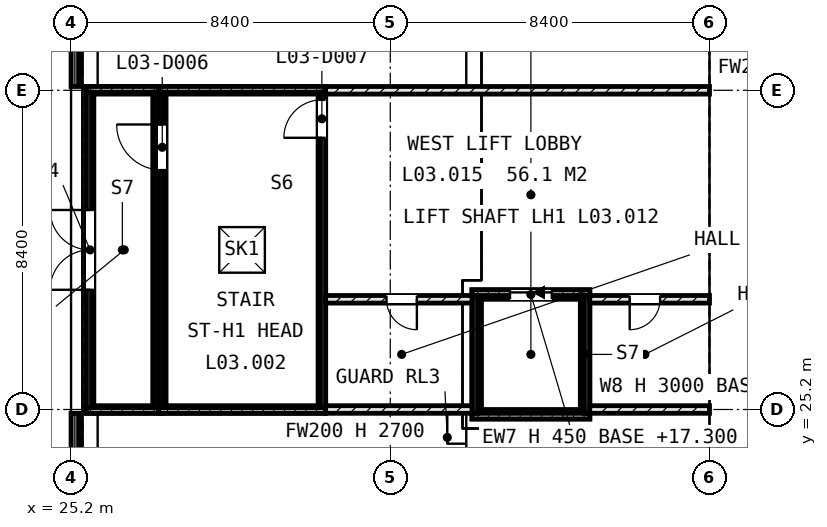
"""IFC4 building model, lengths in metres.
Left out: names, types, materials, properties, quantities, classifications, styles, units other than length and angle.
Written with IfcOpenShell. Run it as: python <this file> out.ifc"""

import sys

from ifc_helpers import new_model, si_unit, direction, frame, frame_2d, origin, origin_2d, place, context, subcontext, project, spatial, rectangle, extrude, element, fill, save


model = new_model("IFC4")
c1 = context("Model", 3, precision=1e-05, world=origin(), true_north=direction((0.0, 1.0)))
c2 = subcontext(c1, "Body", "Model", "MODEL_VIEW")
j1 = project(units=[si_unit("LENGTHUNIT", "METRE"), si_unit("PLANEANGLEUNIT", "RADIAN")], contexts=[c1])
p1 = place(None, origin())
s1 = spatial("IfcSite", under=j1, at=p1, CompositionType="ELEMENT")
p2 = place(p1, origin())
s2 = spatial("IfcBuilding", under=s1, at=p2, CompositionType="ELEMENT")
p3 = place(p2, frame((0.0, 0.0, 14.4)))
s3 = spatial("IfcBuildingStorey", under=s2, at=p3, CompositionType="ELEMENT", Elevation=14.4)
p4 = place(p3, frame((35.75, 25.075, -0.3), z_axis=(0.0, 0.0, 1.0), x_axis=(1.0, 0.0, 0.0)))
e1 = element("IfcWall", 1, at=p4, inside=s3, PredefinedType="SHEAR", context=c2, shape_type="SweptSolid", body=[
    extrude(rectangle(XDim=3.1, YDim=0.25, at=frame_2d((1.55, 0.0))), origin(), (0.0, 0.0, 1.0), 3.0),
])
p5 = place(p3, frame((35.75, 28.225, -0.3), z_axis=(0.0, 0.0, 1.0), x_axis=(1.0, 0.0, 0.0)))
e2 = element("IfcWall", 2, at=p5, inside=s3, PredefinedType="SHEAR", context=c2, shape_type="SweptSolid", body=[
    extrude(rectangle(XDim=3.1, YDim=0.25, at=frame_2d((1.55, 0.0))), origin(), (0.0, 0.0, 1.0), 3.0),
])
p6 = place(p5, frame((1.0, 0.0, 0.3)))
e3 = element("IfcOpeningElement", 3, at=p6, cuts=e2, PredefinedType="OPENING", context=c2, shape_type="SweptSolid", body=[
    extrude(rectangle(XDim=1.1, YDim=2.1, at=frame_2d((0.55, 1.05))), frame((0.0, 0.135, 0.0), z_axis=(0.0, -1.0, 0.0), x_axis=(1.0, 0.0, 0.0)), (0.0, 0.0, 1.0), 0.27),
])
for number, where, z_axis, x_axis in (
    (4, (35.875, 25.2, -0.3), (0.0, 0.0, 1.0), (0.0, 1.0, 0.0)),
    (5, (38.725, 25.2, -0.3), (0.0, 0.0, 1.0), (0.0, 1.0, 0.0)),
):
    element("IfcWall", number, at=place(p3, frame(where, z_axis=z_axis, x_axis=x_axis)), inside=s3, PredefinedType="SHEAR", context=c2, shape_type="SweptSolid", body=[
        extrude(rectangle(XDim=2.9, YDim=0.25, at=frame_2d((1.45, 0.0))), origin(), (0.0, 0.0, 1.0), 3.0),
    ])
for number, where, z_axis, x_axis in (
    (6, (27.5, 25.2, -0.3), (0.0, 0.0, 1.0), (1.0, 0.0, 0.0)),
    (7, (27.5, 33.6, -0.3), (0.0, 0.0, 1.0), (1.0, 0.0, 0.0)),
):
    element("IfcWall", number, at=place(p3, frame(where, z_axis=z_axis, x_axis=x_axis)), inside=s3, PredefinedType="SHEAR", context=c2, shape_type="SweptSolid", body=[
        extrude(rectangle(XDim=4.4, YDim=0.2, at=frame_2d((2.2, 0.0))), origin(), (0.0, 0.0, 1.0), 3.0),
    ])
p7 = place(p3, frame((27.6, 25.3, -0.3), z_axis=(0.0, 0.0, 1.0), x_axis=(0.0, 1.0, 0.0)))
e8 = element("IfcWall", 8, at=p7, inside=s3, PredefinedType="SHEAR", context=c2, shape_type="SweptSolid", body=[
    extrude(rectangle(XDim=8.2, YDim=0.2, at=frame_2d((4.1, 0.0))), origin(), (0.0, 0.0, 1.0), 3.0),
])
p8 = place(p7, frame((6.2, 0.0, 0.3)))
e9 = element("IfcOpeningElement", 9, at=p8, cuts=e8, PredefinedType="OPENING", context=c2, shape_type="SweptSolid", body=[
    extrude(rectangle(XDim=1.2, YDim=2.2, at=frame_2d((0.6, 1.1))), frame((0.0, 0.11, 0.0), z_axis=(0.0, -1.0, 0.0), x_axis=(1.0, 0.0, 0.0)), (0.0, 0.0, 1.0), 0.22),
])
p9 = place(p3, frame((31.8, 25.3, -0.3), z_axis=(0.0, 0.0, 1.0), x_axis=(0.0, 1.0, 0.0)))
e10 = element("IfcWall", 10, at=p9, inside=s3, PredefinedType="SHEAR", context=c2, shape_type="SweptSolid", body=[
    extrude(rectangle(XDim=8.2, YDim=0.2, at=frame_2d((4.1, 0.0))), origin(), (0.0, 0.0, 1.0), 3.0),
])
p10 = place(p9, frame((7.05, 0.0, 0.3)))
e11 = element("IfcOpeningElement", 11, at=p10, cuts=e10, PredefinedType="OPENING", context=c2, shape_type="SweptSolid", body=[
    extrude(rectangle(XDim=1.0, YDim=2.1, at=frame_2d((0.5, 1.05))), frame((0.0, 0.11, 0.0), z_axis=(0.0, -1.0, 0.0), x_axis=(1.0, 0.0, 0.0)), (0.0, 0.0, 1.0), 0.22),
])
for number, where, z_axis, x_axis in (
    (12, (27.6, 25.2, -0.3), (0.0, 0.0, 1.0), (-1.0, 0.0, 0.0)),
    (13, (27.6, 33.6, -0.3), (0.0, 0.0, 1.0), (-1.0, 0.0, 0.0)),
):
    element("IfcWall", number, at=place(p3, frame(where, z_axis=z_axis, x_axis=x_axis)), inside=s3, PredefinedType="SHEAR", context=c2, shape_type="SweptSolid", body=[
        extrude(rectangle(XDim=1.9, YDim=0.2, at=frame_2d((0.95, 0.0))), origin(), (0.0, 0.0, 1.0), 3.0),
    ])
p11 = place(p3, frame((25.7, 25.1, -0.3), z_axis=(0.0, 0.0, 1.0), x_axis=(0.0, 1.0, 0.0)))
e14 = element("IfcWall", 14, at=p11, inside=s3, PredefinedType="SHEAR", context=c2, shape_type="SweptSolid", body=[
    extrude(rectangle(XDim=8.6, YDim=0.2, at=frame_2d((4.3, 0.0))), origin(), (0.0, 0.0, 1.0), 3.0),
])
p12 = place(p11, frame((3.25, 0.0, 0.3)))
e15 = element("IfcOpeningElement", 15, at=p12, cuts=e14, PredefinedType="OPENING", context=c2, shape_type="SweptSolid", body=[
    extrude(rectangle(XDim=2.1, YDim=2.2, at=frame_2d((1.05, 1.1))), frame((0.0, 0.11, 0.0), z_axis=(0.0, -1.0, 0.0), x_axis=(1.0, 0.0, 0.0)), (0.0, 0.0, 1.0), 0.22),
])
p13 = place(p3, frame((25.3, 8.4, 0.0), z_axis=(0.0, 0.0, 1.0), x_axis=(0.0, 1.0, 0.0)))
e16 = element("IfcWall", 16, at=p13, inside=s3, PredefinedType="PARAPET", context=c2, shape_type="SweptSolid", body=[
    extrude(rectangle(XDim=16.7, YDim=0.2, at=frame_2d((8.35, 0.0))), origin(), (0.0, 0.0, 1.0), 1.5),
])
p14 = place(p3, frame((25.3, 33.7, 0.0), z_axis=(0.0, 0.0, 1.0), x_axis=(0.0, 1.0, 0.0)))
e17 = element("IfcWall", 17, at=p14, inside=s3, PredefinedType="PARAPET", context=c2, shape_type="SweptSolid", body=[
    extrude(rectangle(XDim=8.2, YDim=0.2, at=frame_2d((4.1, 0.0))), origin(), (0.0, 0.0, 1.0), 1.5),
])
for number, where, z_axis, x_axis in (
    (18, (27.5, 25.175, 2.9), (0.0, 0.0, 1.0), (1.0, 0.0, 0.0)),
    (19, (27.5, 33.625, 2.9), (0.0, 0.0, 1.0), (1.0, 0.0, 0.0)),
):
    element("IfcWall", number, at=place(p3, frame(where, z_axis=z_axis, x_axis=x_axis)), inside=s3, PredefinedType="PARAPET", context=c2, shape_type="SweptSolid", body=[
        extrude(rectangle(XDim=4.4, YDim=0.15, at=frame_2d((2.2, 0.0))), origin(), (0.0, 0.0, 1.0), 0.45),
    ])
for number, where, z_axis, x_axis in (
    (20, (27.575, 25.25, 2.9), (0.0, 0.0, 1.0), (0.0, 1.0, 0.0)),
    (21, (31.825, 25.25, 2.9), (0.0, 0.0, 1.0), (0.0, 1.0, 0.0)),
):
    element("IfcWall", number, at=place(p3, frame(where, z_axis=z_axis, x_axis=x_axis)), inside=s3, PredefinedType="PARAPET", context=c2, shape_type="SweptSolid", body=[
        extrude(rectangle(XDim=8.3, YDim=0.15, at=frame_2d((4.15, 0.0))), origin(), (0.0, 0.0, 1.0), 0.45),
    ])
for number, where, z_axis, x_axis in (
    (22, (25.6, 25.175, 2.9), (0.0, 0.0, 1.0), (1.0, 0.0, 0.0)),
    (23, (25.6, 33.625, 2.9), (0.0, 0.0, 1.0), (1.0, 0.0, 0.0)),
):
    element("IfcWall", number, at=place(p3, frame(where, z_axis=z_axis, x_axis=x_axis)), inside=s3, PredefinedType="PARAPET", context=c2, shape_type="SweptSolid", body=[
        extrude(rectangle(XDim=1.9, YDim=0.15, at=frame_2d((0.95, 0.0))), origin(), (0.0, 0.0, 1.0), 0.45),
    ])
for number, where, z_axis, x_axis in (
    (24, (25.675, 25.25, 2.9), (0.0, 0.0, 1.0), (0.0, 1.0, 0.0)),
    (25, (27.425, 25.25, 2.9), (0.0, 0.0, 1.0), (0.0, 1.0, 0.0)),
):
    element("IfcWall", number, at=place(p3, frame(where, z_axis=z_axis, x_axis=x_axis)), inside=s3, PredefinedType="PARAPET", context=c2, shape_type="SweptSolid", body=[
        extrude(rectangle(XDim=8.3, YDim=0.15, at=frame_2d((4.15, 0.0))), origin(), (0.0, 0.0, 1.0), 0.45),
    ])
for number, where, z_axis, x_axis in (
    (26, (35.75, 25.025, 2.9), (0.0, 0.0, 1.0), (1.0, 0.0, 0.0)),
    (27, (35.75, 28.275, 2.9), (0.0, 0.0, 1.0), (1.0, 0.0, 0.0)),
):
    element("IfcWall", number, at=place(p3, frame(where, z_axis=z_axis, x_axis=x_axis)), inside=s3, PredefinedType="PARAPET", context=c2, shape_type="SweptSolid", body=[
        extrude(rectangle(XDim=3.1, YDim=0.15, at=frame_2d((1.55, 0.0))), origin(), (0.0, 0.0, 1.0), 0.45),
    ])
for number, where, z_axis, x_axis in (
    (28, (35.825, 25.1, 2.9), (0.0, 0.0, 1.0), (0.0, 1.0, 0.0)),
    (29, (38.775, 25.1, 2.9), (0.0, 0.0, 1.0), (0.0, 1.0, 0.0)),
):
    element("IfcWall", number, at=place(p3, frame(where, z_axis=z_axis, x_axis=x_axis)), inside=s3, PredefinedType="PARAPET", context=c2, shape_type="SweptSolid", body=[
        extrude(rectangle(XDim=3.1, YDim=0.15, at=frame_2d((1.55, 0.0))), origin(), (0.0, 0.0, 1.0), 0.45),
    ])
p15 = place(p3, frame((31.9, 25.2, 0.0), z_axis=(0.0, 0.0, 1.0), x_axis=(1.0, 0.0, 0.0)))
e30 = element("IfcWall", 30, at=p15, inside=s3, PredefinedType="SOLIDWALL", context=c2, shape_type="SweptSolid", body=[
    extrude(rectangle(XDim=3.85, YDim=0.2, at=frame_2d((1.925, 0.0))), origin(), (0.0, 0.0, 1.0), 2.7),
])
p16 = place(p3, frame((38.85, 25.2, 0.0), z_axis=(0.0, 0.0, 1.0), x_axis=(1.0, 0.0, 0.0)))
e31 = element("IfcWall", 31, at=p16, inside=s3, PredefinedType="SOLIDWALL", context=c2, shape_type="SweptSolid", body=[
    extrude(rectangle(XDim=3.15, YDim=0.2, at=frame_2d((1.575, 0.0))), origin(), (0.0, 0.0, 1.0), 2.7),
])
p17 = place(p3, frame((31.9, 28.1, 0.0), z_axis=(0.0, 0.0, 1.0), x_axis=(1.0, 0.0, 0.0)))
e32 = element("IfcWall", 32, at=p17, inside=s3, PredefinedType="SOLIDWALL", context=c2, shape_type="SweptSolid", body=[
    extrude(rectangle(XDim=3.85, YDim=0.2, at=frame_2d((1.925, 0.0))), origin(), (0.0, 0.0, 1.0), 2.7),
])
p18 = place(p17, frame((1.6, 0.0, 0.0)))
e33 = element("IfcOpeningElement", 33, at=p18, cuts=e32, PredefinedType="OPENING", context=c2, shape_type="SweptSolid", body=[
    extrude(rectangle(XDim=0.8, YDim=2.1, at=frame_2d((0.4, 1.05))), frame((0.0, 0.11, 0.0), z_axis=(0.0, -1.0, 0.0), x_axis=(1.0, 0.0, 0.0)), (0.0, 0.0, 1.0), 0.22),
])
p19 = place(p3, frame((38.85, 28.1, 0.0), z_axis=(0.0, 0.0, 1.0), x_axis=(1.0, 0.0, 0.0)))
e34 = element("IfcWall", 34, at=p19, inside=s3, PredefinedType="SOLIDWALL", context=c2, shape_type="SweptSolid", body=[
    extrude(rectangle(XDim=3.15, YDim=0.2, at=frame_2d((1.575, 0.0))), origin(), (0.0, 0.0, 1.0), 2.7),
])
p20 = place(p19, frame((1.05, 0.0, 0.0)))
e35 = element("IfcOpeningElement", 35, at=p20, cuts=e34, PredefinedType="OPENING", context=c2, shape_type="SweptSolid", body=[
    extrude(rectangle(XDim=0.8, YDim=2.1, at=frame_2d((0.4, 1.05))), frame((0.0, 0.11, 0.0), z_axis=(0.0, -1.0, 0.0), x_axis=(1.0, 0.0, 0.0)), (0.0, 0.0, 1.0), 0.22),
])
p21 = place(p3, frame((31.9, 33.6, 0.0), z_axis=(0.0, 0.0, 1.0), x_axis=(1.0, 0.0, 0.0)))
e36 = element("IfcWall", 36, at=p21, inside=s3, PredefinedType="SOLIDWALL", context=c2, shape_type="SweptSolid", body=[
    extrude(rectangle(XDim=10.1, YDim=0.2, at=frame_2d((5.05, 0.0))), origin(), (0.0, 0.0, 1.0), 2.7),
])
p22 = place(p12, origin())
e37 = element("IfcDoor", 37, at=p22, inside=s3, OperationType="DOUBLE_DOOR_SINGLE_SWING", PredefinedType="DOOR", context=c2, shape_type="SweptSolid", body=[
    extrude(rectangle(XDim=2.1, YDim=0.013, at=frame_2d((1.05, 0.007))), frame((0.0, 0.088, 0.0), z_axis=(0.0, -1.0, 0.0), x_axis=(1.0, 0.0, 0.0)), (0.0, 0.0, 1.0), 0.176),
    extrude(rectangle(XDim=0.075, YDim=2.112, at=frame_2d((0.038, 1.069))), frame((0.0, 0.098, 0.0), z_axis=(0.0, -1.0, 0.0), x_axis=(1.0, 0.0, 0.0)), (0.0, 0.0, 1.0), 0.196),
    extrude(rectangle(XDim=0.075, YDim=2.112, at=frame_2d((2.062, 1.069))), frame((0.0, 0.098, 0.0), z_axis=(0.0, -1.0, 0.0), x_axis=(1.0, 0.0, 0.0)), (0.0, 0.0, 1.0), 0.196),
    extrude(rectangle(XDim=2.1, YDim=0.075, at=frame_2d((1.05, 2.163))), frame((0.0, 0.088, 0.0), z_axis=(0.0, -1.0, 0.0), x_axis=(1.0, 0.0, 0.0)), (0.0, 0.0, 1.0), 0.176),
    extrude(rectangle(XDim=1.95, YDim=2.112, at=frame_2d((1.05, 1.069))), frame((0.0, 0.025, 0.0), z_axis=(0.0, -1.0, 0.0), x_axis=(1.0, 0.0, 0.0)), (0.0, 0.0, 1.0), 0.05),
])
fill(e15, e37)
p23 = place(p8, origin())
e38 = element("IfcDoor", 38, at=p23, inside=s3, OperationType="SINGLE_SWING_LEFT", PredefinedType="DOOR", context=c2, shape_type="SweptSolid", body=[
    extrude(rectangle(XDim=1.2, YDim=2.2, at=frame_2d((0.6, 1.1))), frame((0.0, 0.025, 0.0), z_axis=(0.0, -1.0, 0.0), x_axis=(1.0, 0.0, 0.0)), (0.0, 0.0, 1.0), 0.05),
])
fill(e9, e38)
p24 = place(p3, frame((0.0, 0.0, 2.7)))
p25 = place(p24, frame((29.7, 29.4, 0.0)))
p26 = place(p25, frame((0.0, 0.0, 0.15)))
e39 = element("IfcWindow", 39, at=p26, inside=s3, PartitioningType="SINGLE_PANEL", PredefinedType="SKYLIGHT", context=c2, shape_type="SweptSolid", body=[
    extrude(rectangle(XDim=1.2, YDim=1.2, at=origin_2d()), origin(), (0.0, 0.0, 1.0), 0.05),
])
p27 = place(p6, origin())
e40 = element("IfcDoor", 40, at=p27, inside=s3, OperationType="SLIDING_TO_LEFT", PredefinedType="DOOR", context=c2, shape_type="SweptSolid", body=[
    extrude(rectangle(XDim=1.1, YDim=2.1, at=frame_2d((0.55, 1.05))), frame((0.0, 0.025, 0.0), z_axis=(0.0, -1.0, 0.0), x_axis=(1.0, 0.0, 0.0)), (0.0, 0.0, 1.0), 0.05),
])
fill(e3, e40)
p28 = place(p10, origin())
e41 = element("IfcDoor", 41, at=p28, inside=s3, OperationType="SINGLE_SWING_RIGHT", PredefinedType="DOOR", context=c2, shape_type="SweptSolid", body=[
    extrude(rectangle(XDim=1.0, YDim=2.1, at=frame_2d((0.5, 1.05))), frame((0.0, 0.025, 0.0), z_axis=(0.0, -1.0, 0.0), x_axis=(1.0, 0.0, 0.0)), (0.0, 0.0, 1.0), 0.05),
])
fill(e11, e41)
p29 = place(p18, origin())
e42 = element("IfcDoor", 42, at=p29, inside=s3, OperationType="SINGLE_SWING_RIGHT", PredefinedType="DOOR", context=c2, shape_type="SweptSolid", body=[
    extrude(rectangle(XDim=0.8, YDim=2.1, at=frame_2d((0.4, 1.05))), frame((0.0, 0.025, 0.0), z_axis=(0.0, -1.0, 0.0), x_axis=(1.0, 0.0, 0.0)), (0.0, 0.0, 1.0), 0.05),
])
fill(e33, e42)
p30 = place(p20, origin())
e43 = element("IfcDoor", 43, at=p30, inside=s3, OperationType="SINGLE_SWING_LEFT", PredefinedType="DOOR", context=c2, shape_type="SweptSolid", body=[
    extrude(rectangle(XDim=0.8, YDim=2.1, at=frame_2d((0.4, 1.05))), frame((0.0, 0.025, 0.0), z_axis=(0.0, -1.0, 0.0), x_axis=(1.0, 0.0, 0.0)), (0.0, 0.0, 1.0), 0.05),
])
fill(e35, e43)
save(model, sys.argv[1])
